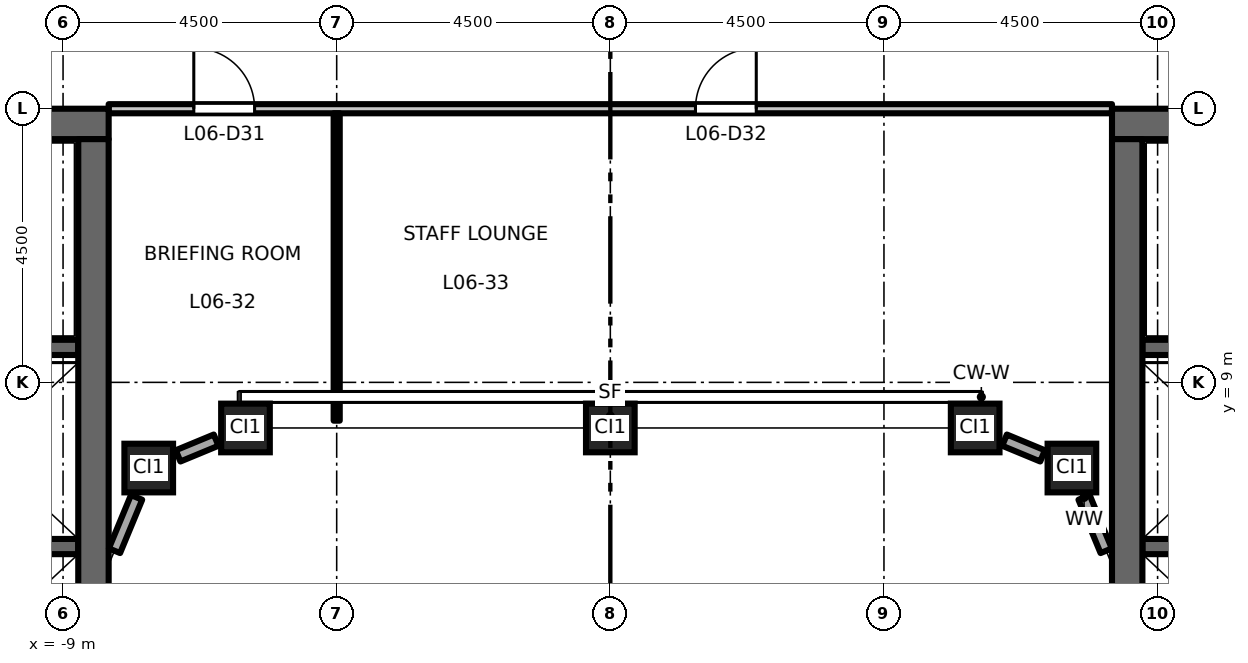
"""IFC4 building model, lengths in metres.
Left out: names, types, materials, properties, quantities, classifications, styles, units other than length and angle.
Written with IfcOpenShell. Run it as: python <this file> out.ifc"""

import sys

from ifc_helpers import new_model, si_unit, direction, frame, frame_2d, origin, origin_2d, place, context, subcontext, project, spatial, rectangle, hollow_rectangle, extrude, element, fill, save


model = new_model("IFC4")
c1 = context("Model", 3, precision=1e-05, world=origin(), true_north=direction((0.0, 1.0)))
c2 = subcontext(c1, "Body", "Model", "MODEL_VIEW")
j1 = project(units=[si_unit("LENGTHUNIT", "METRE"), si_unit("PLANEANGLEUNIT", "RADIAN")], contexts=[c1])
p1 = place(None, origin())
s1 = spatial("IfcSite", under=j1, at=p1, CompositionType="ELEMENT")
p2 = place(p1, origin())
s2 = spatial("IfcBuilding", under=s1, at=p2, CompositionType="ELEMENT")
p3 = place(p2, frame((0.0, 0.0, 31.2)))
s3 = spatial("IfcBuildingStorey", under=s2, at=p3, CompositionType="ELEMENT", Elevation=31.2)
for number, where, z_axis, x_axis in (
    (1, (-7.591, 7.591, 0.0), (0.0, 0.0, 1.0), (1.0, 0.0, 0.0)),
    (2, (-6.0, 8.25, 0.0), (0.0, 0.0, 1.0), (1.0, 0.0, 0.0)),
    (3, (0.0, 8.25, 0.0), (0.0, 0.0, 1.0), (1.0, 0.0, 0.0)),
    (4, (6.0, 8.25, 0.0), (0.0, 0.0, 1.0), (1.0, 0.0, 0.0)),
    (5, (7.591, 7.591, 0.0), (0.0, 0.0, 1.0), (1.0, 0.0, 0.0)),
):
    element("IfcColumn", number, at=place(p3, frame(where, z_axis=z_axis, x_axis=x_axis)), inside=s3, PredefinedType="COLUMN", context=c2, shape_type="SweptSolid", body=[
        extrude(hollow_rectangle(XDim=0.8, YDim=0.8, WallThickness=0.05, at=origin_2d()), origin(), (0.0, 0.0, 1.0), 4.5),
    ])
p4 = place(p3, frame((-8.75, 6.3, 0.0), z_axis=(0.0, 0.0, 1.0), x_axis=(-1.0, 0.0, 0.0)))
e6 = element("IfcWall", 6, at=p4, inside=s3, PredefinedType="SHEAR", context=c2, shape_type="SweptSolid", body=[
    extrude(rectangle(XDim=3.1, YDim=0.25, at=frame_2d((1.55, 0.0))), origin(), (0.0, 0.0, 1.0), 4.35),
])
p5 = place(p3, frame((-8.75, 9.575, 0.0), z_axis=(0.0, 0.0, 1.0), x_axis=(-1.0, 0.0, 0.0)))
e7 = element("IfcWall", 7, at=p5, inside=s3, PredefinedType="SHEAR", context=c2, shape_type="SweptSolid", body=[
    extrude(rectangle(XDim=8.0, YDim=0.25, at=frame_2d((4.0, 0.0))), origin(), (0.0, 0.0, 1.0), 4.35),
])
p6 = place(p5, frame((6.65, 0.0, 0.0)))
e8 = element("IfcOpeningElement", 8, at=p6, cuts=e7, PredefinedType="OPENING", context=c2, shape_type="SweptSolid", body=[
    extrude(rectangle(XDim=1.1, YDim=2.1, at=frame_2d((0.55, 1.05))), frame((0.0, 0.135, 0.0), z_axis=(0.0, -1.0, 0.0), x_axis=(1.0, 0.0, 0.0)), (0.0, 0.0, 1.0), 0.27),
])
p7 = place(p3, frame((-8.25, 13.25, 0.0), z_axis=(0.0, 0.0, 1.0), x_axis=(-1.0, 0.0, 0.0)))
e9 = element("IfcWall", 9, at=p7, inside=s3, PredefinedType="SHEAR", context=c2, shape_type="SweptSolid", body=[
    extrude(rectangle(XDim=13.5, YDim=0.5, at=frame_2d((6.75, 0.0))), origin(), (0.0, 0.0, 1.0), 4.35),
])
p8 = place(p3, frame((-8.5, -13.0, 0.0), z_axis=(0.0, 0.0, 1.0), x_axis=(0.0, 1.0, 0.0)))
e10 = element("IfcWall", 10, at=p8, inside=s3, PredefinedType="SHEAR", context=c2, shape_type="SweptSolid", body=[
    extrude(rectangle(XDim=26.0, YDim=0.5, at=frame_2d((13.0, 0.0))), origin(), (0.0, 0.0, 1.0), 4.35),
])
p9 = place(p3, frame((8.75, 6.3, 0.0), z_axis=(0.0, 0.0, 1.0), x_axis=(1.0, 0.0, 0.0)))
e11 = element("IfcWall", 11, at=p9, inside=s3, PredefinedType="SHEAR", context=c2, shape_type="SweptSolid", body=[
    extrude(rectangle(XDim=3.1, YDim=0.25, at=frame_2d((1.55, 0.0))), origin(), (0.0, 0.0, 1.0), 4.35),
])
p10 = place(p3, frame((8.75, 9.575, 0.0), z_axis=(0.0, 0.0, 1.0), x_axis=(1.0, 0.0, 0.0)))
e12 = element("IfcWall", 12, at=p10, inside=s3, PredefinedType="SHEAR", context=c2, shape_type="SweptSolid", body=[
    extrude(rectangle(XDim=8.0, YDim=0.25, at=frame_2d((4.0, 0.0))), origin(), (0.0, 0.0, 1.0), 4.35),
])
p11 = place(p10, frame((6.65, 0.0, 0.0)))
e13 = element("IfcOpeningElement", 13, at=p11, cuts=e12, PredefinedType="OPENING", context=c2, shape_type="SweptSolid", body=[
    extrude(rectangle(XDim=1.1, YDim=2.1, at=frame_2d((0.55, 1.05))), frame((0.0, 0.135, 0.0), z_axis=(0.0, -1.0, 0.0), x_axis=(1.0, 0.0, 0.0)), (0.0, 0.0, 1.0), 0.27),
])
p12 = place(p3, frame((8.25, 13.25, 0.0), z_axis=(0.0, 0.0, 1.0), x_axis=(1.0, 0.0, 0.0)))
e14 = element("IfcWall", 14, at=p12, inside=s3, PredefinedType="SHEAR", context=c2, shape_type="SweptSolid", body=[
    extrude(rectangle(XDim=13.5, YDim=0.5, at=frame_2d((6.75, 0.0))), origin(), (0.0, 0.0, 1.0), 4.35),
])
p13 = place(p3, frame((8.5, -13.0, 0.0), z_axis=(0.0, 0.0, 1.0), x_axis=(0.0, 1.0, 0.0)))
e15 = element("IfcWall", 15, at=p13, inside=s3, PredefinedType="SHEAR", context=c2, shape_type="SweptSolid", body=[
    extrude(rectangle(XDim=26.0, YDim=0.5, at=frame_2d((13.0, 0.0))), origin(), (0.0, 0.0, 1.0), 4.35),
])
p14 = place(p3, frame((8.154, 6.231, 0.0), z_axis=(0.0, 0.0, 1.0), x_axis=(-0.382624318388, 0.923904016107, 0.0)))
e16 = element("IfcWall", 16, at=p14, inside=s3, PredefinedType="STANDARD", context=c2, shape_type="SweptSolid", body=[
    extrude(rectangle(XDim=0.949, YDim=0.2, at=frame_2d((0.475, 0.0))), origin(), (0.0, 0.0, 1.0), 3.73),
])
for number, where, z_axis, x_axis in (
    (17, (7.108, 7.791, 0.0), (0.0, 0.0, 1.0), (-0.924, 0.383, 0.0)),
    (18, (-6.483, 8.05, 0.0), (0.0, 0.0, 1.0), (-0.924, -0.383, 0.0)),
):
    element("IfcWall", number, at=place(p3, frame(where, z_axis=z_axis, x_axis=x_axis)), inside=s3, PredefinedType="STANDARD", context=c2, shape_type="SweptSolid", body=[
        extrude(rectangle(XDim=0.677, YDim=0.2, at=frame_2d((0.338, 0.0))), origin(), (0.0, 0.0, 1.0), 3.73),
    ])
p15 = place(p3, frame((-7.791, 7.108, 0.0), z_axis=(0.0, 0.0, 1.0), x_axis=(-0.382624318388, -0.923904016107, 0.0)))
e19 = element("IfcWall", 19, at=p15, inside=s3, PredefinedType="STANDARD", context=c2, shape_type="SweptSolid", body=[
    extrude(rectangle(XDim=0.949, YDim=0.2, at=frame_2d((0.475, 0.0))), origin(), (0.0, 0.0, 1.0), 3.73),
])
p16 = place(p3, frame((-8.25, 13.5, 0.0), z_axis=(0.0, 0.0, 1.0), x_axis=(1.0, 0.0, 0.0)))
e20 = element("IfcWall", 20, at=p16, inside=s3, PredefinedType="PARTITIONING", context=c2, shape_type="SweptSolid", body=[
    extrude(rectangle(XDim=16.5, YDim=0.15, at=frame_2d((8.25, 0.0))), origin(), (0.0, 0.0, 1.0), 3.85),
])
p17 = place(p16, frame((1.4, 0.0, 0.0)))
e21 = element("IfcOpeningElement", 21, at=p17, cuts=e20, PredefinedType="OPENING", context=c2, shape_type="SweptSolid", body=[
    extrude(rectangle(XDim=1.0, YDim=2.1, at=frame_2d((0.5, 1.05))), frame((0.0, 0.085, 0.0), z_axis=(0.0, -1.0, 0.0), x_axis=(1.0, 0.0, 0.0)), (0.0, 0.0, 1.0), 0.17),
])
p18 = place(p16, frame((9.65, 0.0, 0.0)))
e22 = element("IfcOpeningElement", 22, at=p18, cuts=e20, PredefinedType="OPENING", context=c2, shape_type="SweptSolid", body=[
    extrude(rectangle(XDim=1.0, YDim=2.1, at=frame_2d((0.5, 1.05))), frame((0.0, 0.085, 0.0), z_axis=(0.0, -1.0, 0.0), x_axis=(1.0, 0.0, 0.0)), (0.0, 0.0, 1.0), 0.17),
])
p19 = place(p3, frame((-4.5, 8.37, 0.0), z_axis=(0.0, 0.0, 1.0), x_axis=(0.0, 1.0, 0.0)))
e23 = element("IfcWall", 23, at=p19, inside=s3, PredefinedType="PARTITIONING", context=c2, shape_type="SweptSolid", body=[
    extrude(rectangle(XDim=5.055, YDim=0.1, at=frame_2d((2.527, 0.0))), origin(), (0.0, 0.0, 1.0), 3.35),
])
p20 = place(p17, origin())
e24 = element("IfcDoor", 24, at=p20, inside=s3, OperationType="SINGLE_SWING_LEFT", PredefinedType="DOOR", context=c2, shape_type="SweptSolid", body=[
    extrude(rectangle(XDim=1.0, YDim=2.1, at=frame_2d((0.5, 1.05))), frame((0.0, 0.025, 0.0), z_axis=(0.0, -1.0, 0.0), x_axis=(1.0, 0.0, 0.0)), (0.0, 0.0, 1.0), 0.05),
])
fill(e21, e24)
p21 = place(p18, origin())
e25 = element("IfcDoor", 25, at=p21, inside=s3, OperationType="SINGLE_SWING_RIGHT", PredefinedType="DOOR", context=c2, shape_type="SweptSolid", body=[
    extrude(rectangle(XDim=1.0, YDim=2.1, at=frame_2d((0.5, 1.05))), frame((0.0, 0.025, 0.0), z_axis=(0.0, -1.0, 0.0), x_axis=(1.0, 0.0, 0.0)), (0.0, 0.0, 1.0), 0.05),
])
fill(e22, e25)
save(model, sys.argv[1])
